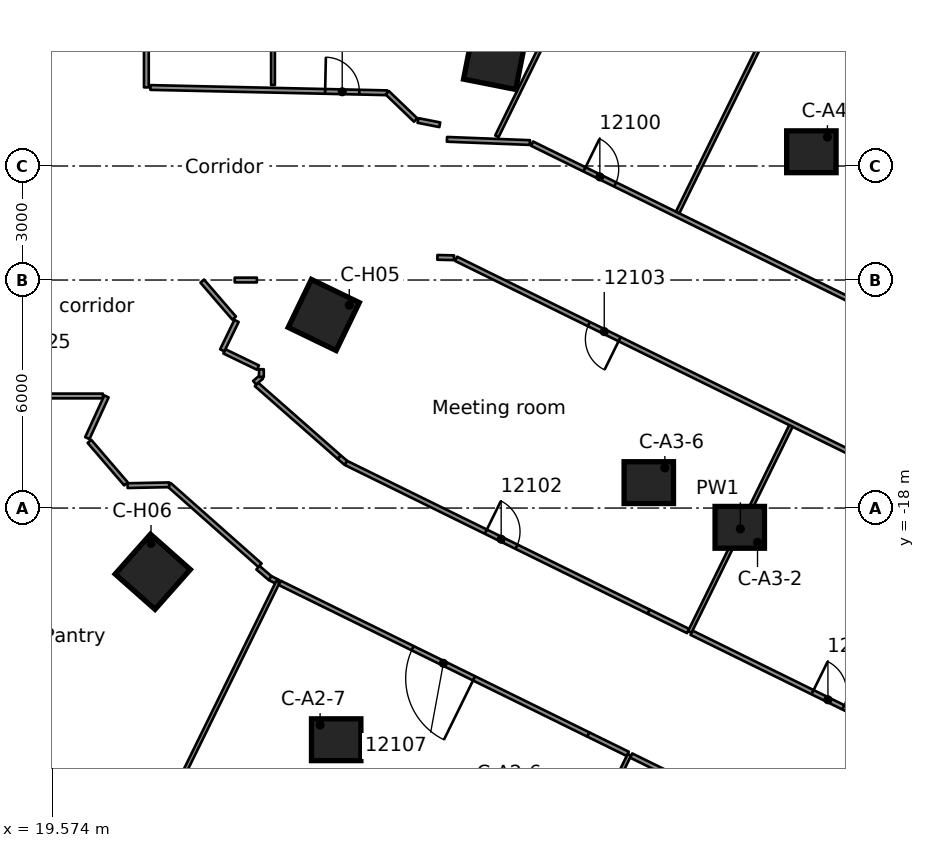
"""IFC4 building model, lengths in metres.
Left out: names, types, materials, properties, quantities, classifications, styles, units other than length and angle.
Written with IfcOpenShell. Run it as: python <this file> out.ifc"""

import sys

from ifc_helpers import new_model, si_unit, direction, frame, frame_2d, origin, origin_2d, place, context, subcontext, project, spatial, rectangle, extrude, element, fill, save


model = new_model("IFC4")
c1 = context("Model", 3, precision=1e-05, world=origin(), true_north=direction((0.0, 1.0)))
c2 = subcontext(c1, "Body", "Model", "MODEL_VIEW")
j1 = project(units=[si_unit("LENGTHUNIT", "METRE"), si_unit("PLANEANGLEUNIT", "RADIAN")], contexts=[c1])
p1 = place(None, origin())
s1 = spatial("IfcSite", under=j1, at=p1, CompositionType="ELEMENT")
p2 = place(p1, origin())
s2 = spatial("IfcBuilding", under=s1, at=p2, CompositionType="ELEMENT")
p3 = place(p2, frame((0.0, 0.0, 58.8)))
s3 = spatial("IfcBuildingStorey", under=s2, at=p3, CompositionType="ELEMENT", Elevation=58.8)
for number, where, z_axis, x_axis in (
    (1, (27.046, -24.096, 0.0), (0.0, 0.0, 1.0), (1.0, 0.0, 0.0)),
    (2, (37.666, -18.507, 0.0), (0.0, 0.0, 1.0), (1.0, 0.0, 0.0)),
    (3, (35.272, -17.331, 0.0), (0.0, 0.0, 1.0), (1.0, 0.0, 0.0)),
    (4, (39.55, -8.625, 0.0), (0.0, 0.0, 1.0), (1.0, 0.0, 0.0)),
):
    element("IfcColumn", number, at=place(p3, frame(where, z_axis=z_axis, x_axis=x_axis)), inside=s3, PredefinedType="COLUMN", context=c2, shape_type="SweptSolid", body=[
        extrude(rectangle(XDim=1.3, YDim=1.1, at=origin_2d()), origin(), (0.0, 0.0, 1.0), 3.5),
    ])
for number, where, z_axis, x_axis in (
    (5, (31.22, -6.163, 0.0), (0.0, 0.0, 1.0), (0.981, -0.194, 0.0)),
    (6, (26.719, -12.92, 0.0), (0.0, 0.0, 1.0), (0.9, -0.435, 0.0)),
    (7, (22.219, -19.677, 0.0), (0.0, 0.0, 1.0), (0.749, -0.663, 0.0)),
):
    element("IfcColumn", number, at=place(p3, frame(where, z_axis=z_axis, x_axis=x_axis)), inside=s3, PredefinedType="COLUMN", context=c2, shape_type="SweptSolid", body=[
        extrude(rectangle(XDim=1.4, YDim=1.4, at=origin_2d()), origin(), (0.0, 0.0, 1.0), 3.5),
    ])
p4 = place(p3, frame((20.553, -16.245, 0.0), z_axis=(0.0, 0.0, 1.0), x_axis=(0.65185455754, -0.758344008886, 0.0)))
e8 = element("IfcWall", 8, at=p4, inside=s3, PredefinedType="PARTITIONING", context=c2, shape_type="SweptSolid", body=[
    extrude(rectangle(XDim=1.474, YDim=0.125, at=frame_2d((0.737, 0.0))), origin(), (0.0, 0.0, 1.0), 3.08),
])
p5 = place(p3, frame((23.521, -12.028, 0.0), z_axis=(0.0, 0.0, 1.0), x_axis=(0.653179910437, -0.757202749996, 0.0)))
e9 = element("IfcWall", 9, at=p5, inside=s3, PredefinedType="PARTITIONING", context=c2, shape_type="SweptSolid", body=[
    extrude(rectangle(XDim=1.286, YDim=0.125, at=frame_2d((0.643, 0.0))), origin(), (0.0, 0.0, 1.0), 3.08),
])
p6 = place(p3, frame((24.947, -14.745, 0.0), z_axis=(0.0, 0.0, 1.0), x_axis=(0.751005565427, -0.660295873603, 0.0)))
e10 = element("IfcWall", 10, at=p6, inside=s3, PredefinedType="PARTITIONING", context=c2, shape_type="SweptSolid", body=[
    extrude(rectangle(XDim=2.901, YDim=0.125, at=frame_2d((1.451, 0.0))), origin(), (0.0, 0.0, 1.0), 3.08),
])
p7 = place(p3, frame((22.651, -17.388, 0.0), z_axis=(0.0, 0.0, 1.0), x_axis=(0.748538321382, -0.663091533216, 0.0)))
e11 = element("IfcWall", 11, at=p7, inside=s3, PredefinedType="PARTITIONING", context=c2, shape_type="SweptSolid", body=[
    extrude(rectangle(XDim=3.194, YDim=0.125, at=frame_2d((1.597, 0.0))), origin(), (0.0, 0.0, 1.0), 3.08),
])
p8 = place(p3, frame((27.126, -16.661, 0.0), z_axis=(0.0, 0.0, 1.0), x_axis=(0.758443722334, -0.651738536571, 0.0)))
e12 = element("IfcWall", 12, at=p8, inside=s3, PredefinedType="PARTITIONING", context=c2, shape_type="SweptSolid", body=[
    extrude(rectangle(XDim=0.233, YDim=0.125, at=frame_2d((0.117, 0.0))), origin(), (0.0, 0.0, 1.0), 3.08),
])
p9 = place(p3, frame((24.986, -19.569, 0.0), z_axis=(0.0, 0.0, 1.0), x_axis=(0.759419144431, -0.650601693106, 0.0)))
e13 = element("IfcWall", 13, at=p9, inside=s3, PredefinedType="PARTITIONING", context=c2, shape_type="SweptSolid", body=[
    extrude(rectangle(XDim=0.424, YDim=0.125, at=frame_2d((0.212, 0.0))), origin(), (0.0, 0.0, 1.0), 3.08),
])
p10 = place(p3, frame((33.681, -23.959, 0.0), z_axis=(0.0, 0.0, 1.0), x_axis=(-0.897502075903, 0.44101023089, 0.0)))
e14 = element("IfcWall", 14, at=p10, inside=s3, PredefinedType="PARTITIONING", context=c2, shape_type="SweptSolid", body=[
    extrude(rectangle(XDim=9.052, YDim=0.125, at=frame_2d((4.526, 0.0))), origin(), (0.0, 0.0, 1.0), 3.08),
])
p11 = place(p10, frame((3.35, 0.0, 0.0)))
e15 = element("IfcOpeningElement", 15, at=p11, cuts=e14, PredefinedType="OPENING", context=c2, shape_type="SweptSolid", body=[
    extrude(rectangle(XDim=1.8, YDim=2.1, at=frame_2d((0.9, 1.05))), frame((0.0, 0.073, 0.0), z_axis=(0.0, -1.0, 0.0), x_axis=(1.0, 0.0, 0.0)), (0.0, 0.0, 1.0), 0.145),
])
p12 = place(p3, frame((44.815, -29.429, 0.0), z_axis=(0.0, 0.0, 1.0), x_axis=(-0.8975062817, 0.441001671549, 0.0)))
e16 = element("IfcWall", 16, at=p12, inside=s3, PredefinedType="PARTITIONING", context=c2, shape_type="SweptSolid", body=[
    extrude(rectangle(XDim=11.15, YDim=0.125, at=frame_2d((5.575, 0.0))), origin(), (0.0, 0.0, 1.0), 3.08),
])
p13 = place(p12, frame((6.149, 0.0, 0.0)))
e17 = element("IfcOpeningElement", 17, at=p13, cuts=e16, PredefinedType="OPENING", context=c2, shape_type="SweptSolid", body=[
    extrude(rectangle(XDim=1.1, YDim=2.1, at=frame_2d((0.55, 1.05))), frame((0.0, 0.073, 0.0), z_axis=(0.0, -1.0, 0.0), x_axis=(1.0, 0.0, 0.0)), (0.0, 0.0, 1.0), 0.145),
])
p14 = place(p3, frame((27.304, -16.813, 0.0), z_axis=(0.0, 0.0, 1.0), x_axis=(0.897492436915, -0.441029846701, 0.0)))
e18 = element("IfcWall", 18, at=p14, inside=s3, PredefinedType="PARTITIONING", context=c2, shape_type="SweptSolid", body=[
    extrude(rectangle(XDim=8.875, YDim=0.125, at=frame_2d((4.438, 0.0))), origin(), (0.0, 0.0, 1.0), 3.08),
])
p15 = place(p14, frame((4.1, 0.0, 0.0)))
e19 = element("IfcOpeningElement", 19, at=p15, cuts=e18, PredefinedType="OPENING", context=c2, shape_type="SweptSolid", body=[
    extrude(rectangle(XDim=0.9, YDim=2.1, at=frame_2d((0.45, 1.05))), frame((0.0, 0.073, 0.0), z_axis=(0.0, -1.0, 0.0), x_axis=(1.0, 0.0, 0.0)), (0.0, 0.0, 1.0), 0.145),
])
p16 = place(p3, frame((36.396, -21.28, 0.0), z_axis=(0.0, 0.0, 1.0), x_axis=(0.897479279636, -0.441056620656, 0.0)))
e20 = element("IfcWall", 20, at=p16, inside=s3, PredefinedType="PARTITIONING", context=c2, shape_type="SweptSolid", body=[
    extrude(rectangle(XDim=8.087, YDim=0.125, at=frame_2d((4.043, 0.0))), origin(), (0.0, 0.0, 1.0), 3.08),
])
p17 = place(p16, frame((3.55, 0.0, 0.0)))
e21 = element("IfcOpeningElement", 21, at=p17, cuts=e20, PredefinedType="OPENING", context=c2, shape_type="SweptSolid", body=[
    extrude(rectangle(XDim=0.9, YDim=2.1, at=frame_2d((0.45, 1.05))), frame((0.0, 0.073, 0.0), z_axis=(0.0, -1.0, 0.0), x_axis=(1.0, 0.0, 0.0)), (0.0, 0.0, 1.0), 0.145),
])
p18 = place(p3, frame((49.036, -20.696, 0.0), z_axis=(0.0, 0.0, 1.0), x_axis=(-0.897509654304, 0.440994807715, 0.0)))
e22 = element("IfcWall", 22, at=p18, inside=s3, PredefinedType="PARTITIONING", context=c2, shape_type="SweptSolid", body=[
    extrude(rectangle(XDim=20.985, YDim=0.125, at=frame_2d((10.492, 0.0))), origin(), (0.0, 0.0, 1.0), 3.08),
])
p19 = place(p18, frame((16.192, 0.0, 0.0)))
e23 = element("IfcOpeningElement", 23, at=p19, cuts=e22, PredefinedType="OPENING", context=c2, shape_type="SweptSolid", body=[
    extrude(rectangle(XDim=0.9, YDim=2.1, at=frame_2d((0.45, 1.05))), frame((0.0, 0.073, 0.0), z_axis=(0.0, -1.0, 0.0), x_axis=(1.0, 0.0, 0.0)), (0.0, 0.0, 1.0), 0.145),
])
p20 = place(p3, frame((32.2, -8.411, 0.0), z_axis=(0.0, 0.0, 1.0), x_axis=(0.897530587373, -0.440952202318, 0.0)))
e24 = element("IfcWall", 24, at=p20, inside=s3, PredefinedType="PARTITIONING", context=c2, shape_type="SweptSolid", body=[
    extrude(rectangle(XDim=17.78, YDim=0.125, at=frame_2d((8.89, 0.0))), origin(), (0.0, 0.0, 1.0), 3.08),
])
p21 = place(p20, frame((1.538, 0.0, 0.0)))
e25 = element("IfcOpeningElement", 25, at=p21, cuts=e24, PredefinedType="OPENING", context=c2, shape_type="SweptSolid", body=[
    extrude(rectangle(XDim=0.9, YDim=2.1, at=frame_2d((0.45, 1.05))), frame((0.0, 0.073, 0.0), z_axis=(0.0, -1.0, 0.0), x_axis=(1.0, 0.0, 0.0)), (0.0, 0.0, 1.0), 0.145),
])
p22 = place(p20, frame((13.24, 0.0, 0.0)))
e26 = element("IfcOpeningElement", 26, at=p22, cuts=e24, PredefinedType="OPENING", context=c2, shape_type="SweptSolid", body=[
    extrude(rectangle(XDim=0.9, YDim=2.1, at=frame_2d((0.45, 1.05))), frame((0.0, 0.073, 0.0), z_axis=(0.0, -1.0, 0.0), x_axis=(1.0, 0.0, 0.0)), (0.0, 0.0, 1.0), 0.145),
])
p23 = place(p3, frame((25.308, -19.845, 0.0), z_axis=(0.0, 0.0, 1.0), x_axis=(0.897628948174, -0.440751938624, 0.0)))
e27 = element("IfcWall", 27, at=p23, inside=s3, PredefinedType="PARTITIONING", context=c2, shape_type="SweptSolid", body=[
    extrude(rectangle(XDim=0.227, YDim=0.125, at=frame_2d((0.114, 0.0))), origin(), (0.0, 0.0, 1.0), 3.08),
])
p24 = place(p3, frame((33.681, -23.959, 0.0), z_axis=(0.0, 0.0, 1.0), x_axis=(0.897699526178, -0.440608171394, 0.0)))
e28 = element("IfcWall", 28, at=p24, inside=s3, PredefinedType="PARTITIONING", context=c2, shape_type="SweptSolid", body=[
    extrude(rectangle(XDim=1.155, YDim=0.125, at=frame_2d((0.578, 0.0))), origin(), (0.0, 0.0, 1.0), 3.08),
])
p25 = place(p3, frame((35.269, -20.727, 0.0), z_axis=(0.0, 0.0, 1.0), x_axis=(0.897658489219, -0.440691770667, 0.0)))
e29 = element("IfcWall", 29, at=p25, inside=s3, PredefinedType="PARTITIONING", context=c2, shape_type="SweptSolid", body=[
    extrude(rectangle(XDim=1.155, YDim=0.125, at=frame_2d((0.578, 0.0))), origin(), (0.0, 0.0, 1.0), 3.08),
])
p26 = place(p3, frame((24.104, -13.877, 0.0), z_axis=(0.0, 0.0, 1.0), x_axis=(0.900272548254, -0.435326703593, 0.0)))
e30 = element("IfcWall", 30, at=p26, inside=s3, PredefinedType="PARTITIONING", context=c2, shape_type="SweptSolid", body=[
    extrude(rectangle(XDim=0.981, YDim=0.125, at=frame_2d((0.49, 0.0))), origin(), (0.0, 0.0, 1.0), 3.08),
])
p27 = place(p3, frame((32.144, -8.383, 0.0), z_axis=(0.0, 0.0, 1.0), x_axis=(-0.999243574473, 0.038888029962, 0.0)))
e31 = element("IfcWall", 31, at=p27, inside=s3, PredefinedType="PARTITIONING", context=c2, shape_type="SweptSolid", body=[
    extrude(rectangle(XDim=2.185, YDim=0.125, at=frame_2d((1.092, 0.0))), origin(), (0.0, 0.0, 1.0), 3.08),
])
p28 = place(p3, frame((29.198, -7.802, 0.0), z_axis=(0.0, 0.0, 1.0), x_axis=(0.98115426744, -0.19322604246, 0.0)))
e32 = element("IfcWall", 32, at=p28, inside=s3, PredefinedType="PARTITIONING", context=c2, shape_type="SweptSolid", body=[
    extrude(rectangle(XDim=0.585, YDim=0.125, at=frame_2d((0.292, 0.0))), origin(), (0.0, 0.0, 1.0), 3.08),
])
p29 = place(p3, frame((29.709, -11.404, 0.0), z_axis=(0.0, 0.0, 1.0), x_axis=(0.99973778302, -0.022899021846, 0.0)))
e33 = element("IfcWall", 33, at=p29, inside=s3, PredefinedType="PARTITIONING", context=c2, shape_type="SweptSolid", body=[
    extrude(rectangle(XDim=0.437, YDim=0.125, at=frame_2d((0.219, 0.0))), origin(), (0.0, 0.0, 1.0), 3.08),
])
p30 = place(p3, frame((22.158, -6.934, 0.0), z_axis=(0.0, 0.0, 1.0), x_axis=(0.999751648266, -0.022285461407, 0.0)))
e34 = element("IfcWall", 34, at=p30, inside=s3, PredefinedType="PARTITIONING", context=c2, shape_type="SweptSolid", body=[
    extrude(rectangle(XDim=6.233, YDim=0.125, at=frame_2d((3.117, 0.0))), origin(), (0.0, 0.0, 1.0), 3.08),
])
p31 = place(p30, frame((4.598, 0.0, 0.0)))
e35 = element("IfcOpeningElement", 35, at=p31, cuts=e34, PredefinedType="OPENING", context=c2, shape_type="SweptSolid", body=[
    extrude(rectangle(XDim=0.9, YDim=2.1, at=frame_2d((0.45, 1.05))), frame((0.0, 0.073, 0.0), z_axis=(0.0, -1.0, 0.0), x_axis=(1.0, 0.0, 0.0)), (0.0, 0.0, 1.0), 0.145),
])
p32 = place(p3, frame((20.906, -15.051, 0.0), z_axis=(0.0, 0.0, 1.0), x_axis=(-1.0, 0.0, 0.0)))
e36 = element("IfcWall", 36, at=p32, inside=s3, PredefinedType="PARTITIONING", context=c2, shape_type="SweptSolid", body=[
    extrude(rectangle(XDim=9.915, YDim=0.125, at=frame_2d((4.958, 0.0))), origin(), (0.0, 0.0, 1.0), 3.08),
])
p33 = place(p32, frame((7.008, 0.0, 0.0)))
e37 = element("IfcOpeningElement", 37, at=p33, cuts=e36, PredefinedType="OPENING", context=c2, shape_type="SweptSolid", body=[
    extrude(rectangle(XDim=0.9, YDim=2.1, at=frame_2d((0.45, 1.05))), frame((0.0, 0.073, 0.0), z_axis=(0.0, -1.0, 0.0), x_axis=(1.0, 0.0, 0.0)), (0.0, 0.0, 1.0), 0.145),
])
p34 = place(p32, frame((2.002, 0.0, 0.0)))
e38 = element("IfcOpeningElement", 38, at=p34, cuts=e36, PredefinedType="OPENING", context=c2, shape_type="SweptSolid", body=[
    extrude(rectangle(XDim=0.9, YDim=2.1, at=frame_2d((0.45, 1.05))), frame((0.0, 0.073, 0.0), z_axis=(0.0, -1.0, 0.0), x_axis=(1.0, 0.0, 0.0)), (0.0, 0.0, 1.0), 0.145),
])
p35 = place(p3, frame((24.376, -12.0, 0.0), z_axis=(0.0, 0.0, 1.0), x_axis=(1.0, 0.0, 0.0)))
e39 = element("IfcWall", 39, at=p35, inside=s3, PredefinedType="PARTITIONING", context=c2, shape_type="SweptSolid", body=[
    extrude(rectangle(XDim=0.583, YDim=0.125, at=frame_2d((0.292, 0.0))), origin(), (0.0, 0.0, 1.0), 3.08),
])
p36 = place(p3, frame((24.9, -14.702, 0.0), z_axis=(0.0, 0.0, 1.0), x_axis=(0.76279062292, 0.646645548648, 0.0)))
e40 = element("IfcWall", 40, at=p36, inside=s3, PredefinedType="PARTITIONING", context=c2, shape_type="SweptSolid", body=[
    extrude(rectangle(XDim=0.233, YDim=0.125, at=frame_2d((0.117, 0.0))), origin(), (0.0, 0.0, 1.0), 3.08),
])
p37 = place(p3, frame((21.556, -17.41, 0.0), z_axis=(0.0, 0.0, 1.0), x_axis=(0.999798720757, 0.020062850584, 0.0)))
e41 = element("IfcWall", 41, at=p37, inside=s3, PredefinedType="PARTITIONING", context=c2, shape_type="SweptSolid", body=[
    extrude(rectangle(XDim=1.095, YDim=0.125, at=frame_2d((0.548, 0.0))), origin(), (0.0, 0.0, 1.0), 3.08),
])
p38 = place(p3, frame((28.766, -36.695, 0.0), z_axis=(0.0, 0.0, 1.0), x_axis=(0.440983805809, 0.897515060049, 0.0)))
e42 = element("IfcWall", 42, at=p38, inside=s3, PredefinedType="PARTITIONING", context=c2, shape_type="SweptSolid", body=[
    extrude(rectangle(XDim=13.599, YDim=0.1, at=frame_2d((6.799, 0.0))), origin(), (0.0, 0.0, 1.0), 3.08),
])
p39 = place(p3, frame((36.351, -21.258, 0.0), z_axis=(0.0, 0.0, 1.0), x_axis=(0.440827848832, 0.897591670914, 0.0)))
e43 = element("IfcWall", 43, at=p39, inside=s3, PredefinedType="PARTITIONING", context=c2, shape_type="SweptSolid", body=[
    extrude(rectangle(XDim=6.036, YDim=0.1, at=frame_2d((3.018, 0.0))), origin(), (0.0, 0.0, 1.0), 3.08),
])
p40 = place(p3, frame((36.031, -10.223, 0.0), z_axis=(0.0, 0.0, 1.0), x_axis=(0.44102750491, 0.897493587672, 0.0)))
e44 = element("IfcWall", 44, at=p40, inside=s3, PredefinedType="PARTITIONING", context=c2, shape_type="SweptSolid", body=[
    extrude(rectangle(XDim=13.537, YDim=0.1, at=frame_2d((6.768, 0.0))), origin(), (0.0, 0.0, 1.0), 3.08),
])
p41 = place(p3, frame((19.516, -32.151, 0.0), z_axis=(0.0, 0.0, 1.0), x_axis=(0.440904640859, 0.897553952512, 0.0)))
e45 = element("IfcWall", 45, at=p41, inside=s3, PredefinedType="PARTITIONING", context=c2, shape_type="SweptSolid", body=[
    extrude(rectangle(XDim=13.599, YDim=0.1, at=frame_2d((6.799, 0.0))), origin(), (0.0, 0.0, 1.0), 3.08),
])
p42 = place(p3, frame((31.275, -8.217, 0.0), z_axis=(0.0, 0.0, 1.0), x_axis=(0.440962245693, 0.897525653045, 0.0)))
e46 = element("IfcWall", 46, at=p42, inside=s3, PredefinedType="PARTITIONING", context=c2, shape_type="SweptSolid", body=[
    extrude(rectangle(XDim=13.833, YDim=0.1, at=frame_2d((6.917, 0.0))), origin(), (0.0, 0.0, 1.0), 3.08),
])
p43 = place(p3, frame((24.048, -13.85, 0.0), z_axis=(0.0, 0.0, 1.0), x_axis=(0.435939229334, 0.899976104309, 0.0)))
e47 = element("IfcWall", 47, at=p43, inside=s3, PredefinedType="PARTITIONING", context=c2, shape_type="SweptSolid", body=[
    extrude(rectangle(XDim=0.86, YDim=0.125, at=frame_2d((0.43, 0.0))), origin(), (0.0, 0.0, 1.0), 3.08),
])
p44 = place(p3, frame((20.497, -16.16, 0.0), z_axis=(0.0, 0.0, 1.0), x_axis=(0.417134821579, 0.908844618527, 0.0)))
e48 = element("IfcWall", 48, at=p44, inside=s3, PredefinedType="PARTITIONING", context=c2, shape_type="SweptSolid", body=[
    extrude(rectangle(XDim=1.208, YDim=0.125, at=frame_2d((0.604, 0.0))), origin(), (0.0, 0.0, 1.0), 3.08),
])
p45 = place(p3, frame((29.137, -7.79, 0.0), z_axis=(0.0, 0.0, 1.0), x_axis=(-0.721457989557, 0.692458207623, 0.0)))
e49 = element("IfcWall", 49, at=p45, inside=s3, PredefinedType="PARTITIONING", context=c2, shape_type="SweptSolid", body=[
    extrude(rectangle(XDim=1.035, YDim=0.125, at=frame_2d((0.518, 0.0))), origin(), (0.0, 0.0, 1.0), 3.08),
])
p46 = place(p3, frame((25.383, -6.87, 0.0), z_axis=(0.0, 0.0, 1.0), x_axis=(0.0, 1.0, 0.0)))
e50 = element("IfcWall", 50, at=p46, inside=s3, PredefinedType="PARTITIONING", context=c2, shape_type="SweptSolid", body=[
    extrude(rectangle(XDim=5.938, YDim=0.1, at=frame_2d((2.969, 0.0))), origin(), (0.0, 0.0, 1.0), 3.08),
])
p47 = place(p3, frame((25.078, -14.551, 0.0), z_axis=(0.0, 0.0, 1.0), x_axis=(0.0, 1.0, 0.0)))
e51 = element("IfcWall", 51, at=p47, inside=s3, PredefinedType="PARTITIONING", context=c2, shape_type="SweptSolid", body=[
    extrude(rectangle(XDim=0.204, YDim=0.125, at=frame_2d((0.102, 0.0))), origin(), (0.0, 0.0, 1.0), 3.08),
])
p48 = place(p3, frame((22.051, 15.05, 0.0), z_axis=(0.0, 0.0, 1.0), x_axis=(0.0, -1.0, 0.0)))
e52 = element("IfcWall", 52, at=p48, inside=s3, PredefinedType="PARTITIONING", context=c2, shape_type="SweptSolid", body=[
    extrude(rectangle(XDim=21.981, YDim=0.125, at=frame_2d((10.99, 0.0))), origin(), (0.0, 0.0, 1.0), 3.08),
])
p49 = place(p48, frame((9.15, 0.0, 0.0)))
e53 = element("IfcOpeningElement", 53, at=p49, cuts=e52, PredefinedType="OPENING", context=c2, shape_type="SweptSolid", body=[
    extrude(rectangle(XDim=0.9, YDim=2.1, at=frame_2d((0.45, 1.05))), frame((0.0, 0.073, 0.0), z_axis=(0.0, -1.0, 0.0), x_axis=(1.0, 0.0, 0.0)), (0.0, 0.0, 1.0), 0.145),
])
p50 = place(p48, frame((18.332, 0.0, 0.0)))
e54 = element("IfcOpeningElement", 54, at=p50, cuts=e52, PredefinedType="OPENING", context=c2, shape_type="SweptSolid", body=[
    extrude(rectangle(XDim=1.1, YDim=2.1, at=frame_2d((0.55, 1.05))), frame((0.0, 0.073, 0.0), z_axis=(0.0, -1.0, 0.0), x_axis=(1.0, 0.0, 0.0)), (0.0, 0.0, 1.0), 0.145),
])
p51 = place(p21, origin())
e55 = element("IfcDoor", 55, at=p51, inside=s3, OperationType="SINGLE_SWING_LEFT", PredefinedType="DOOR", context=c2, shape_type="SweptSolid", body=[
    extrude(rectangle(XDim=0.9, YDim=2.1, at=frame_2d((0.45, 1.05))), frame((0.0, 0.025, 0.0), z_axis=(0.0, -1.0, 0.0), x_axis=(1.0, 0.0, 0.0)), (0.0, 0.0, 1.0), 0.05),
])
fill(e25, e55)
p52 = place(p15, origin())
e56 = element("IfcDoor", 56, at=p52, inside=s3, OperationType="SINGLE_SWING_RIGHT", PredefinedType="DOOR", context=c2, shape_type="SweptSolid", body=[
    extrude(rectangle(XDim=0.9, YDim=2.1, at=frame_2d((0.45, 1.05))), frame((0.0, 0.025, 0.0), z_axis=(0.0, -1.0, 0.0), x_axis=(1.0, 0.0, 0.0)), (0.0, 0.0, 1.0), 0.05),
])
fill(e19, e56)
p53 = place(p19, origin())
e57 = element("IfcDoor", 57, at=p53, inside=s3, OperationType="SINGLE_SWING_RIGHT", PredefinedType="DOOR", context=c2, shape_type="SweptSolid", body=[
    extrude(rectangle(XDim=0.9, YDim=2.1, at=frame_2d((0.45, 1.05))), frame((0.0, 0.025, 0.0), z_axis=(0.0, -1.0, 0.0), x_axis=(1.0, 0.0, 0.0)), (0.0, 0.0, 1.0), 0.05),
])
fill(e23, e57)
p54 = place(p17, origin())
e58 = element("IfcDoor", 58, at=p54, inside=s3, OperationType="SINGLE_SWING_LEFT", PredefinedType="DOOR", context=c2, shape_type="SweptSolid", body=[
    extrude(rectangle(XDim=0.9, YDim=2.1, at=frame_2d((0.45, 1.05))), frame((0.0, 0.025, 0.0), z_axis=(0.0, -1.0, 0.0), x_axis=(1.0, 0.0, 0.0)), (0.0, 0.0, 1.0), 0.05),
])
fill(e21, e58)
p55 = place(p11, origin())
e59 = element("IfcDoor", 59, at=p55, inside=s3, OperationType="DOUBLE_DOOR_SINGLE_SWING", PredefinedType="DOOR", context=c2, shape_type="SweptSolid", body=[
    extrude(rectangle(XDim=1.8, YDim=2.1, at=frame_2d((0.9, 1.05))), frame((0.0, 0.025, 0.0), z_axis=(0.0, -1.0, 0.0), x_axis=(1.0, 0.0, 0.0)), (0.0, 0.0, 1.0), 0.05),
])
fill(e15, e59)
p56 = place(p31, origin())
e60 = element("IfcDoor", 60, at=p56, inside=s3, OperationType="SINGLE_SWING_RIGHT", PredefinedType="DOOR", context=c2, shape_type="SweptSolid", body=[
    extrude(rectangle(XDim=0.9, YDim=2.1, at=frame_2d((0.45, 1.05))), frame((0.0, 0.025, 0.0), z_axis=(0.0, -1.0, 0.0), x_axis=(1.0, 0.0, 0.0)), (0.0, 0.0, 1.0), 0.05),
])
fill(e35, e60)
save(model, sys.argv[1])
